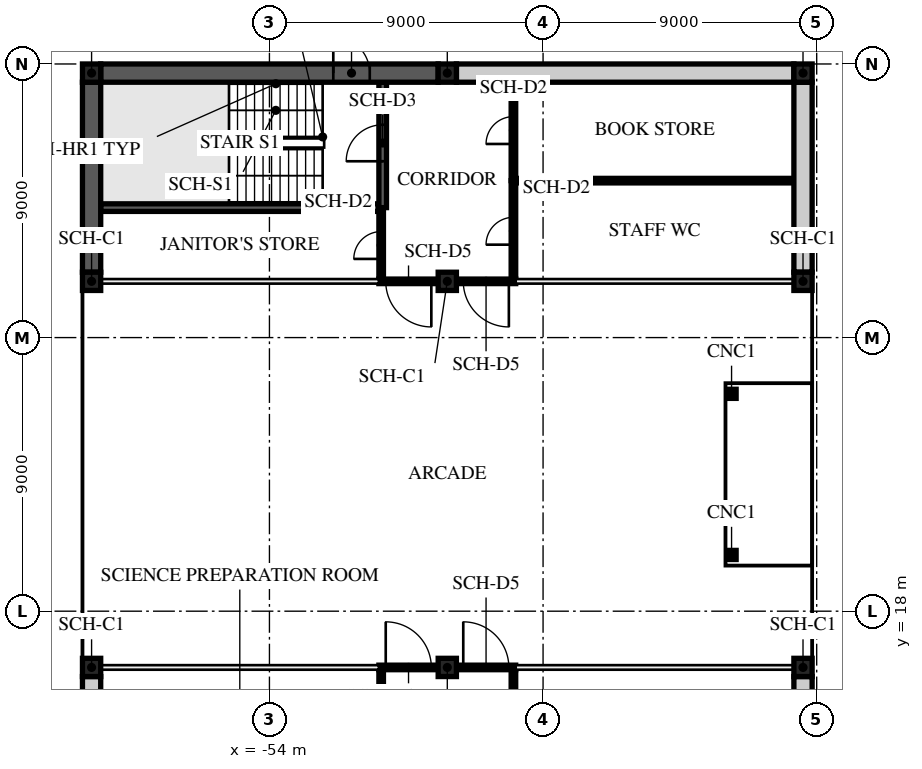
"""IFC4 building model, lengths in metres.
Left out: names, types, materials, properties, quantities, classifications, styles, units other than length and angle.
Written with IfcOpenShell. Run it as: python <this file> out.ifc"""

import sys

from ifc_helpers import new_model, si_unit, direction, frame, frame_2d, origin, origin_2d, place, context, subcontext, project, spatial, rectangle, extrude, element, fill, save


model = new_model("IFC4")
c1 = context("Model", 3, precision=1e-05, world=origin(), true_north=direction((0.0, 1.0)))
c2 = subcontext(c1, "Body", "Model", "MODEL_VIEW")
j1 = project(units=[si_unit("LENGTHUNIT", "METRE"), si_unit("PLANEANGLEUNIT", "RADIAN")], contexts=[c1])
p1 = place(None, origin())
s1 = spatial("IfcSite", under=j1, at=p1, CompositionType="ELEMENT")
p2 = place(p1, origin())
s2 = spatial("IfcBuilding", under=s1, at=p2, CompositionType="ELEMENT")
p3 = place(p2, origin())
s3 = spatial("IfcBuildingStorey", under=s2, at=p3, CompositionType="ELEMENT", Elevation=0.0)
p4 = place(p3, frame((-36.0, 27.0, 0.0), z_axis=(0.0, 0.0, 1.0), x_axis=(1.0, 0.0, 0.0)))
e1 = element("IfcWall", 1, at=p4, inside=s3, PredefinedType="PARTITIONING", context=c2, shape_type="SweptSolid", body=[
    extrude(rectangle(XDim=0.9, YDim=0.1, at=frame_2d((0.45, 0.0))), origin(), (0.0, 0.0, 1.0), 4.1),
])
for number, where, z_axis, x_axis in (
    (2, (-59.85, 16.15, -0.2), (0.0, 0.0, 1.0), (1.0, 0.0, 0.0)),
    (3, (-59.85, 28.85, -0.2), (0.0, 0.0, 1.0), (1.0, 0.0, 0.0)),
    (4, (-59.85, 35.7, -0.2), (0.0, 0.0, 1.0), (1.0, 0.0, 0.0)),
    (5, (-48.15, 16.15, -0.2), (0.0, 0.0, 1.0), (1.0, 0.0, 0.0)),
    (6, (-48.15, 28.85, -0.2), (0.0, 0.0, 1.0), (1.0, 0.0, 0.0)),
    (7, (-48.15, 35.7, -0.2), (0.0, 0.0, 1.0), (1.0, 0.0, 0.0)),
    (8, (-36.45, 16.15, -0.2), (0.0, 0.0, 1.0), (1.0, 0.0, 0.0)),
    (9, (-36.45, 28.85, -0.2), (0.0, 0.0, 1.0), (1.0, 0.0, 0.0)),
    (10, (-36.45, 35.7, -0.2), (0.0, 0.0, 1.0), (1.0, 0.0, 0.0)),
):
    element("IfcColumn", number, at=place(p3, frame(where, z_axis=z_axis, x_axis=x_axis)), inside=s3, PredefinedType="COLUMN", context=c2, shape_type="SweptSolid", body=[
        extrude(rectangle(XDim=0.6, YDim=0.6, at=origin_2d()), origin(), (0.0, 0.0, 1.0), 4.7),
    ])
p5 = place(p3, frame((-50.325, 9.172, 0.0), z_axis=(0.0, 0.0, 1.0), x_axis=(0.0, 1.0, 0.0)))
e11 = element("IfcWall", 11, at=p5, inside=s3, PredefinedType="PARTITIONING", context=c2, shape_type="SweptSolid", body=[
    extrude(rectangle(XDim=6.903, YDim=0.15, at=frame_2d((3.451, 0.0))), origin(), (0.0, 0.0, 1.0), 4.1),
])
p6 = place(p5, frame((3.039, 0.0, 0.0)))
e12 = element("IfcOpeningElement", 12, at=p6, cuts=e11, PredefinedType="OPENING", context=c2, shape_type="SweptSolid", body=[
    extrude(rectangle(XDim=0.9, YDim=2.1, at=frame_2d((0.45, 1.05))), frame((0.0, 0.085, 0.0), z_axis=(0.0, -1.0, 0.0), x_axis=(1.0, 0.0, 0.0)), (0.0, 0.0, 1.0), 0.17),
])
p7 = place(p3, frame((-45.975, 10.391, 0.0), z_axis=(0.0, 0.0, 1.0), x_axis=(0.0, 1.0, 0.0)))
e13 = element("IfcWall", 13, at=p7, inside=s3, PredefinedType="PARTITIONING", context=c2, shape_type="SweptSolid", body=[
    extrude(rectangle(XDim=5.684, YDim=0.15, at=frame_2d((2.842, 0.0))), origin(), (0.0, 0.0, 1.0), 4.1),
])
p8 = place(p7, frame((2.43, 0.0, 0.0)))
e14 = element("IfcOpeningElement", 14, at=p8, cuts=e13, PredefinedType="OPENING", context=c2, shape_type="SweptSolid", body=[
    extrude(rectangle(XDim=0.9, YDim=2.1, at=frame_2d((0.45, 1.05))), frame((0.0, 0.085, 0.0), z_axis=(0.0, -1.0, 0.0), x_axis=(1.0, 0.0, 0.0)), (0.0, 0.0, 1.0), 0.17),
])
p9 = place(p3, frame((-59.55, 31.275, 0.0), z_axis=(0.0, 0.0, 1.0), x_axis=(1.0, 0.0, 0.0)))
e15 = element("IfcWall", 15, at=p9, inside=s3, PredefinedType="SHEAR", context=c2, shape_type="SweptSolid", body=[
    extrude(rectangle(XDim=9.15, YDim=0.25, at=frame_2d((4.575, 0.0))), origin(), (0.0, 0.0, 1.0), 4.1),
])
p10 = place(p3, frame((-50.325, 28.925, 0.0), z_axis=(0.0, 0.0, 1.0), x_axis=(0.0, 1.0, 0.0)))
e16 = element("IfcWall", 16, at=p10, inside=s3, PredefinedType="PARTITIONING", context=c2, shape_type="SweptSolid", body=[
    extrude(rectangle(XDim=2.35, YDim=0.15, at=frame_2d((1.175, 0.0))), origin(), (0.0, 0.0, 1.0), 4.1),
])
p11 = place(p10, frame((0.663, 0.0, 0.0)))
e17 = element("IfcOpeningElement", 17, at=p11, cuts=e16, PredefinedType="OPENING", context=c2, shape_type="SweptSolid", body=[
    extrude(rectangle(XDim=0.9, YDim=2.1, at=frame_2d((0.45, 1.05))), frame((0.0, 0.085, 0.0), z_axis=(0.0, -1.0, 0.0), x_axis=(1.0, 0.0, 0.0)), (0.0, 0.0, 1.0), 0.17),
])
p12 = place(p3, frame((-50.275, 31.275, 0.0), z_axis=(0.0, 0.0, 1.0), x_axis=(0.0, 1.0, 0.0)))
e18 = element("IfcWall", 18, at=p12, inside=s3, PredefinedType="SHEAR", context=c2, shape_type="SweptSolid", body=[
    extrude(rectangle(XDim=4.125, YDim=0.25, at=frame_2d((2.062, 0.0))), origin(), (0.0, 0.0, 1.0), 4.1),
])
p13 = place(p12, frame((1.525, 0.0, 0.0)))
e19 = element("IfcOpeningElement", 19, at=p13, cuts=e18, PredefinedType="OPENING", context=c2, shape_type="SweptSolid", body=[
    extrude(rectangle(XDim=1.2, YDim=2.1, at=frame_2d((0.6, 1.05))), frame((0.0, 0.135, 0.0), z_axis=(0.0, -1.0, 0.0), x_axis=(1.0, 0.0, 0.0)), (0.0, 0.0, 1.0), 0.27),
])
p14 = place(p3, frame((-45.9, 32.163, 0.0), z_axis=(0.0, 0.0, 1.0), x_axis=(1.0, 0.0, 0.0)))
e20 = element("IfcWall", 20, at=p14, inside=s3, PredefinedType="PARTITIONING", context=c2, shape_type="SweptSolid", body=[
    extrude(rectangle(XDim=9.15, YDim=0.15, at=frame_2d((4.575, 0.0))), origin(), (0.0, 0.0, 1.0), 4.1),
])
p15 = place(p3, frame((-45.975, 28.925, 0.0), z_axis=(0.0, 0.0, 1.0), x_axis=(0.0, 1.0, 0.0)))
e21 = element("IfcWall", 21, at=p15, inside=s3, PredefinedType="PARTITIONING", context=c2, shape_type="SweptSolid", body=[
    extrude(rectangle(XDim=3.238, YDim=0.15, at=frame_2d((1.619, 0.0))), origin(), (0.0, 0.0, 1.0), 4.1),
])
p16 = place(p15, frame((1.131, 0.0, 0.0)))
e22 = element("IfcOpeningElement", 22, at=p16, cuts=e21, PredefinedType="OPENING", context=c2, shape_type="SweptSolid", body=[
    extrude(rectangle(XDim=0.9, YDim=2.1, at=frame_2d((0.45, 1.05))), frame((0.0, 0.085, 0.0), z_axis=(0.0, -1.0, 0.0), x_axis=(1.0, 0.0, 0.0)), (0.0, 0.0, 1.0), 0.17),
])
p17 = place(p3, frame((-45.975, 32.163, 0.0), z_axis=(0.0, 0.0, 1.0), x_axis=(0.0, 1.0, 0.0)))
e23 = element("IfcWall", 23, at=p17, inside=s3, PredefinedType="PARTITIONING", context=c2, shape_type="SweptSolid", body=[
    extrude(rectangle(XDim=3.237, YDim=0.15, at=frame_2d((1.619, 0.0))), origin(), (0.0, 0.0, 1.0), 4.1),
])
p18 = place(p17, frame((1.206, 0.0, 0.0)))
e24 = element("IfcOpeningElement", 24, at=p18, cuts=e23, PredefinedType="OPENING", context=c2, shape_type="SweptSolid", body=[
    extrude(rectangle(XDim=0.9, YDim=2.1, at=frame_2d((0.45, 1.05))), frame((0.0, 0.085, 0.0), z_axis=(0.0, -1.0, 0.0), x_axis=(1.0, 0.0, 0.0)), (0.0, 0.0, 1.0), 0.17),
])
p19 = place(p3, frame((-59.85, 8.936, -0.2), z_axis=(0.0, 0.0, 1.0), x_axis=(0.0, 1.0, 0.0)))
e25 = element("IfcWall", 25, at=p19, inside=s3, PredefinedType="STANDARD", context=c2, shape_type="SweptSolid", body=[
    extrude(rectangle(XDim=6.914, YDim=0.6, at=frame_2d((3.457, 0.0))), origin(), (0.0, 0.0, 1.0), 4.3),
])
p20 = place(p19, frame((0.89, 0.0, 1.1)))
e26 = element("IfcOpeningElement", 26, at=p20, cuts=e25, PredefinedType="OPENING", context=c2, shape_type="SweptSolid", body=[
    extrude(rectangle(XDim=2.4, YDim=2.1, at=frame_2d((1.2, 1.05))), frame((0.0, 0.31, 0.0), z_axis=(0.0, -1.0, 0.0), x_axis=(1.0, 0.0, 0.0)), (0.0, 0.0, 1.0), 0.62),
])
p21 = place(p19, frame((3.906, 0.0, 1.1)))
e27 = element("IfcOpeningElement", 27, at=p21, cuts=e25, PredefinedType="OPENING", context=c2, shape_type="SweptSolid", body=[
    extrude(rectangle(XDim=2.4, YDim=2.1, at=frame_2d((1.2, 1.05))), frame((0.0, 0.31, 0.0), z_axis=(0.0, -1.0, 0.0), x_axis=(1.0, 0.0, 0.0)), (0.0, 0.0, 1.0), 0.62),
])
p22 = place(p3, frame((-59.85, 29.15, -0.2), z_axis=(0.0, 0.0, 1.0), x_axis=(0.0, 1.0, 0.0)))
e28 = element("IfcWall", 28, at=p22, inside=s3, PredefinedType="STANDARD", context=c2, shape_type="SweptSolid", body=[
    extrude(rectangle(XDim=6.25, YDim=0.6, at=frame_2d((3.125, 0.0))), origin(), (0.0, 0.0, 1.0), 4.3),
])
p23 = place(p3, frame((-59.55, 35.7, -0.2), z_axis=(0.0, 0.0, 1.0), x_axis=(1.0, 0.0, 0.0)))
e29 = element("IfcWall", 29, at=p23, inside=s3, PredefinedType="STANDARD", context=c2, shape_type="SweptSolid", body=[
    extrude(rectangle(XDim=11.1, YDim=0.6, at=frame_2d((5.55, 0.0))), origin(), (0.0, 0.0, 1.0), 4.3),
])
p24 = place(p23, frame((7.65, 0.0, 0.2)))
e30 = element("IfcOpeningElement", 30, at=p24, cuts=e29, PredefinedType="OPENING", context=c2, shape_type="SweptSolid", body=[
    extrude(rectangle(XDim=1.2, YDim=2.1, at=frame_2d((0.6, 1.05))), frame((0.0, 0.31, 0.0), z_axis=(0.0, -1.0, 0.0), x_axis=(1.0, 0.0, 0.0)), (0.0, 0.0, 1.0), 0.62),
])
p25 = place(p3, frame((-47.85, 35.7, -0.2), z_axis=(0.0, 0.0, 1.0), x_axis=(1.0, 0.0, 0.0)))
e31 = element("IfcWall", 31, at=p25, inside=s3, PredefinedType="STANDARD", context=c2, shape_type="SweptSolid", body=[
    extrude(rectangle(XDim=11.1, YDim=0.6, at=frame_2d((5.55, 0.0))), origin(), (0.0, 0.0, 1.0), 4.3),
])
p26 = place(p3, frame((-36.45, 35.4, -0.2), z_axis=(0.0, 0.0, 1.0), x_axis=(0.0, -1.0, 0.0)))
e32 = element("IfcWall", 32, at=p26, inside=s3, PredefinedType="STANDARD", context=c2, shape_type="SweptSolid", body=[
    extrude(rectangle(XDim=6.25, YDim=0.6, at=frame_2d((3.125, 0.0))), origin(), (0.0, 0.0, 1.0), 4.3),
])
p27 = place(p3, frame((-36.45, 15.85, -0.2), z_axis=(0.0, 0.0, 1.0), x_axis=(0.0, -1.0, 0.0)))
e33 = element("IfcWall", 33, at=p27, inside=s3, PredefinedType="STANDARD", context=c2, shape_type="SweptSolid", body=[
    extrude(rectangle(XDim=6.914, YDim=0.6, at=frame_2d((3.457, 0.0))), origin(), (0.0, 0.0, 1.0), 4.3),
])
p28 = place(p3, frame((-48.45, 28.85, 0.0), z_axis=(0.0, 0.0, 1.0), x_axis=(-1.0, 0.0, 0.0)))
e34 = element("IfcWall", 34, at=p28, inside=s3, PredefinedType="PARTITIONING", context=c2, shape_type="SweptSolid", body=[
    extrude(rectangle(XDim=1.95, YDim=0.15, at=frame_2d((0.975, 0.0))), origin(), (0.0, 0.0, 1.0), 4.1),
])
p29 = place(p28, frame((0.225, 0.0, 0.0)))
e35 = element("IfcOpeningElement", 35, at=p29, cuts=e34, PredefinedType="OPENING", context=c2, shape_type="SweptSolid", body=[
    extrude(rectangle(XDim=1.5, YDim=2.4, at=frame_2d((0.75, 1.2))), frame((0.0, 0.085, 0.0), z_axis=(0.0, -1.0, 0.0), x_axis=(1.0, 0.0, 0.0)), (0.0, 0.0, 1.0), 0.17),
])
p30 = place(p3, frame((-45.9, 28.85, 0.0), z_axis=(0.0, 0.0, 1.0), x_axis=(-1.0, 0.0, 0.0)))
e36 = element("IfcWall", 36, at=p30, inside=s3, PredefinedType="PARTITIONING", context=c2, shape_type="SweptSolid", body=[
    extrude(rectangle(XDim=1.95, YDim=0.15, at=frame_2d((0.975, 0.0))), origin(), (0.0, 0.0, 1.0), 4.1),
])
p31 = place(p30, frame((0.225, 0.0, 0.0)))
e37 = element("IfcOpeningElement", 37, at=p31, cuts=e36, PredefinedType="OPENING", context=c2, shape_type="SweptSolid", body=[
    extrude(rectangle(XDim=1.5, YDim=2.4, at=frame_2d((0.75, 1.2))), frame((0.0, 0.085, 0.0), z_axis=(0.0, -1.0, 0.0), x_axis=(1.0, 0.0, 0.0)), (0.0, 0.0, 1.0), 0.17),
])
p32 = place(p3, frame((-50.4, 16.15, 0.0), z_axis=(0.0, 0.0, 1.0), x_axis=(1.0, 0.0, 0.0)))
e38 = element("IfcWall", 38, at=p32, inside=s3, PredefinedType="PARTITIONING", context=c2, shape_type="SweptSolid", body=[
    extrude(rectangle(XDim=1.95, YDim=0.15, at=frame_2d((0.975, 0.0))), origin(), (0.0, 0.0, 1.0), 4.1),
])
p33 = place(p32, frame((0.225, 0.0, 0.0)))
e39 = element("IfcOpeningElement", 39, at=p33, cuts=e38, PredefinedType="OPENING", context=c2, shape_type="SweptSolid", body=[
    extrude(rectangle(XDim=1.5, YDim=2.4, at=frame_2d((0.75, 1.2))), frame((0.0, 0.085, 0.0), z_axis=(0.0, -1.0, 0.0), x_axis=(1.0, 0.0, 0.0)), (0.0, 0.0, 1.0), 0.17),
])
p34 = place(p3, frame((-47.85, 16.15, 0.0), z_axis=(0.0, 0.0, 1.0), x_axis=(1.0, 0.0, 0.0)))
e40 = element("IfcWall", 40, at=p34, inside=s3, PredefinedType="PARTITIONING", context=c2, shape_type="SweptSolid", body=[
    extrude(rectangle(XDim=1.95, YDim=0.15, at=frame_2d((0.975, 0.0))), origin(), (0.0, 0.0, 1.0), 4.1),
])
p35 = place(p34, frame((0.225, 0.0, 0.0)))
e41 = element("IfcOpeningElement", 41, at=p35, cuts=e40, PredefinedType="OPENING", context=c2, shape_type="SweptSolid", body=[
    extrude(rectangle(XDim=1.5, YDim=2.4, at=frame_2d((0.75, 1.2))), frame((0.0, 0.085, 0.0), z_axis=(0.0, -1.0, 0.0), x_axis=(1.0, 0.0, 0.0)), (0.0, 0.0, 1.0), 0.17),
])
p36 = place(p3, frame((-30.876, 35.7, 0.0), z_axis=(0.0, 0.0, 1.0), x_axis=(-0.707106781187, -0.707106781187, 0.0)))
e42 = element("IfcWall", 42, at=p36, inside=s3, PredefinedType="STANDARD", context=c2, shape_type="SweptSolid", body=[
    extrude(rectangle(XDim=6.823, YDim=0.6, at=frame_2d((3.411, 0.0))), origin(), (0.0, 0.0, 1.0), 4.1),
])
p37 = place(p3, frame((-35.7, 30.876, 0.0), z_axis=(0.0, 0.0, 1.0), x_axis=(0.0, -1.0, 0.0)))
e43 = element("IfcWall", 43, at=p37, inside=s3, PredefinedType="STANDARD", context=c2, shape_type="SweptSolid", body=[
    extrude(rectangle(XDim=3.876, YDim=0.6, at=frame_2d((1.938, 0.0))), origin(), (0.0, 0.0, 1.0), 4.1),
])
p38 = place(p3, frame((-35.7, 20.8, 0.0), z_axis=(0.0, 0.0, 1.0), x_axis=(0.0, 1.0, 0.0)))
e44 = element("IfcWall", 44, at=p38, inside=s3, PredefinedType="STANDARD", context=c2, shape_type="SweptSolid", body=[
    extrude(rectangle(XDim=3.4, YDim=0.6, at=frame_2d((1.7, 0.0))), origin(), (0.0, 0.0, 1.0), 4.1),
])
p39 = place(p38, frame((0.5, 0.0, 0.0)))
e45 = element("IfcOpeningElement", 45, at=p39, cuts=e44, PredefinedType="OPENING", context=c2, shape_type="SweptSolid", body=[
    extrude(rectangle(XDim=2.4, YDim=2.4, at=frame_2d((1.2, 1.2))), frame((0.0, 0.31, 0.0), z_axis=(0.0, -1.0, 0.0), x_axis=(1.0, 0.0, 0.0)), (0.0, 0.0, 1.0), 0.62),
])
p40 = place(p3, frame((-35.7, 18.0, 0.0), z_axis=(0.0, 0.0, 1.0), x_axis=(0.0, -1.0, 0.0)))
e46 = element("IfcWall", 46, at=p40, inside=s3, PredefinedType="STANDARD", context=c2, shape_type="SweptSolid", body=[
    extrude(rectangle(XDim=48.876, YDim=0.6, at=frame_2d((24.438, 0.0))), origin(), (0.0, 0.0, 1.0), 4.1),
])
for number, where, z_axis, x_axis in (
    (47, (-38.8, 25.15, 0.0), (0.0, 0.0, 1.0), (0.0, -1.0, 0.0)),
    (48, (-38.8, 19.85, 0.0), (0.0, 0.0, 1.0), (0.0, -1.0, 0.0)),
    (49, (-36.3, 25.15, 0.0), (0.0, 0.0, 1.0), (0.0, -1.0, 0.0)),
    (50, (-36.3, 19.85, 0.0), (0.0, 0.0, 1.0), (0.0, -1.0, 0.0)),
):
    element("IfcColumn", number, at=place(p3, frame(where, z_axis=z_axis, x_axis=x_axis)), inside=s3, PredefinedType="COLUMN", context=c2, shape_type="SweptSolid", body=[
        extrude(rectangle(XDim=0.3, YDim=0.3, at=origin_2d()), origin(), (0.0, 0.0, 1.0), 3.35),
    ])
p41 = place(p11, origin())
e51 = element("IfcDoor", 51, at=p41, inside=s3, OperationType="SINGLE_SWING_RIGHT", PredefinedType="DOOR", context=c2, shape_type="SweptSolid", body=[
    extrude(rectangle(XDim=0.9, YDim=2.1, at=frame_2d((0.45, 1.05))), frame((0.0, 0.025, 0.0), z_axis=(0.0, -1.0, 0.0), x_axis=(1.0, 0.0, 0.0)), (0.0, 0.0, 1.0), 0.05),
])
fill(e17, e51)
p42 = place(p13, origin())
e52 = element("IfcDoor", 52, at=p42, inside=s3, OperationType="SINGLE_SWING_LEFT", PredefinedType="DOOR", context=c2, shape_type="SweptSolid", body=[
    extrude(rectangle(XDim=1.2, YDim=2.1, at=frame_2d((0.6, 1.05))), frame((0.0, 0.025, 0.0), z_axis=(0.0, -1.0, 0.0), x_axis=(1.0, 0.0, 0.0)), (0.0, 0.0, 1.0), 0.05),
])
fill(e19, e52)
p43 = place(p16, origin())
e53 = element("IfcDoor", 53, at=p43, inside=s3, OperationType="SINGLE_SWING_RIGHT", PredefinedType="DOOR", context=c2, shape_type="SweptSolid", body=[
    extrude(rectangle(XDim=0.9, YDim=2.1, at=frame_2d((0.45, 1.05))), frame((0.0, 0.025, 0.0), z_axis=(0.0, -1.0, 0.0), x_axis=(1.0, 0.0, 0.0)), (0.0, 0.0, 1.0), 0.05),
])
fill(e22, e53)
p44 = place(p18, origin())
e54 = element("IfcDoor", 54, at=p44, inside=s3, OperationType="SINGLE_SWING_LEFT", PredefinedType="DOOR", context=c2, shape_type="SweptSolid", body=[
    extrude(rectangle(XDim=0.9, YDim=2.1, at=frame_2d((0.45, 1.05))), frame((0.0, 0.025, 0.0), z_axis=(0.0, -1.0, 0.0), x_axis=(1.0, 0.0, 0.0)), (0.0, 0.0, 1.0), 0.05),
])
fill(e24, e54)
p45 = place(p24, origin())
e55 = element("IfcDoor", 55, at=p45, inside=s3, OperationType="SINGLE_SWING_RIGHT", PredefinedType="DOOR", context=c2, shape_type="SweptSolid", body=[
    extrude(rectangle(XDim=1.2, YDim=2.1, at=frame_2d((0.6, 1.05))), frame((0.0, 0.025, 0.0), z_axis=(0.0, -1.0, 0.0), x_axis=(1.0, 0.0, 0.0)), (0.0, 0.0, 1.0), 0.05),
])
fill(e30, e55)
p46 = place(p29, origin())
e56 = element("IfcDoor", 56, at=p46, inside=s3, OperationType="DOUBLE_DOOR_SINGLE_SWING", PredefinedType="DOOR", context=c2, shape_type="SweptSolid", body=[
    extrude(rectangle(XDim=1.5, YDim=2.4, at=frame_2d((0.75, 1.2))), frame((0.0, 0.025, 0.0), z_axis=(0.0, -1.0, 0.0), x_axis=(1.0, 0.0, 0.0)), (0.0, 0.0, 1.0), 0.05),
])
fill(e35, e56)
p47 = place(p31, origin())
e57 = element("IfcDoor", 57, at=p47, inside=s3, OperationType="DOUBLE_DOOR_SINGLE_SWING", PredefinedType="DOOR", context=c2, shape_type="SweptSolid", body=[
    extrude(rectangle(XDim=1.5, YDim=2.4, at=frame_2d((0.75, 1.2))), frame((0.0, 0.025, 0.0), z_axis=(0.0, -1.0, 0.0), x_axis=(1.0, 0.0, 0.0)), (0.0, 0.0, 1.0), 0.05),
])
fill(e37, e57)
p48 = place(p33, origin())
e58 = element("IfcDoor", 58, at=p48, inside=s3, OperationType="DOUBLE_DOOR_SINGLE_SWING", PredefinedType="DOOR", context=c2, shape_type="SweptSolid", body=[
    extrude(rectangle(XDim=1.5, YDim=2.4, at=frame_2d((0.75, 1.2))), frame((0.0, 0.025, 0.0), z_axis=(0.0, -1.0, 0.0), x_axis=(1.0, 0.0, 0.0)), (0.0, 0.0, 1.0), 0.05),
])
fill(e39, e58)
p49 = place(p35, origin())
e59 = element("IfcDoor", 59, at=p49, inside=s3, OperationType="DOUBLE_DOOR_SINGLE_SWING", PredefinedType="DOOR", context=c2, shape_type="SweptSolid", body=[
    extrude(rectangle(XDim=1.5, YDim=2.4, at=frame_2d((0.75, 1.2))), frame((0.0, 0.025, 0.0), z_axis=(0.0, -1.0, 0.0), x_axis=(1.0, 0.0, 0.0)), (0.0, 0.0, 1.0), 0.05),
])
fill(e41, e59)
p50 = place(p39, origin())
e60 = element("IfcDoor", 60, at=p50, inside=s3, OperationType="DOUBLE_DOOR_SINGLE_SWING", PredefinedType="DOOR", context=c2, shape_type="SweptSolid", body=[
    extrude(rectangle(XDim=2.4, YDim=2.4, at=frame_2d((1.2, 1.2))), frame((0.0, 0.025, 0.0), z_axis=(0.0, -1.0, 0.0), x_axis=(1.0, 0.0, 0.0)), (0.0, 0.0, 1.0), 0.05),
])
fill(e45, e60)
save(model, sys.argv[1])
